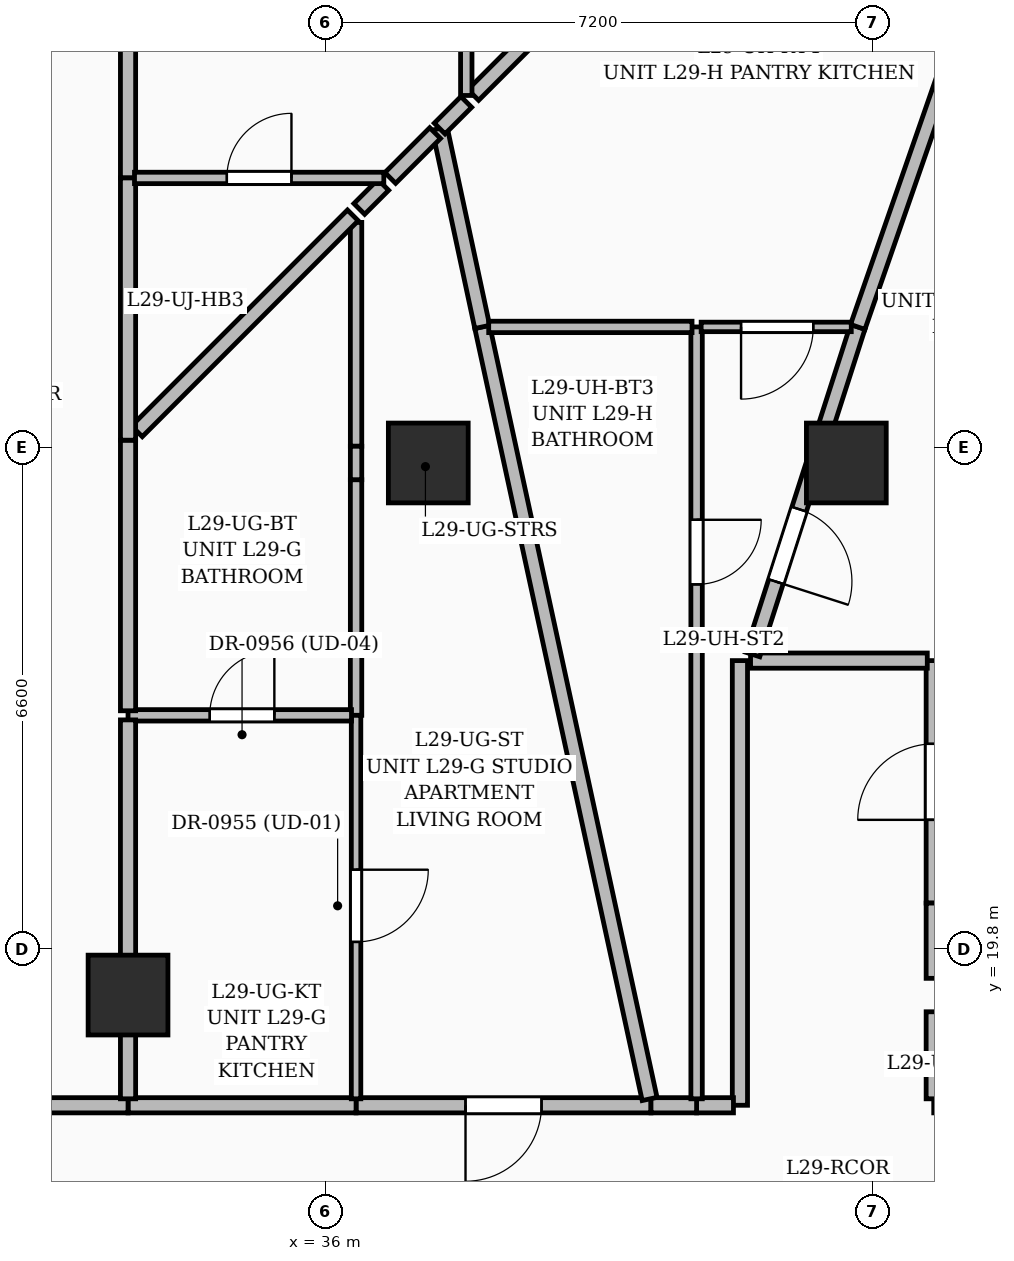
"""IFC4 building model, lengths in metres.
Left out: names, types, materials, properties, quantities, classifications, styles, units other than length and angle.
Written with IfcOpenShell. Run it as: python <this file> out.ifc"""

import sys

from ifc_helpers import new_model, si_unit, direction, frame, frame_2d, origin, origin_2d, place, context, subcontext, project, spatial, rectangle, extrude, element, fill, save


model = new_model("IFC4")
c1 = context("Model", 3, precision=1e-05, world=origin(), true_north=direction((0.0, 1.0)))
c2 = subcontext(c1, "Body", "Model", "MODEL_VIEW")
j1 = project(units=[si_unit("LENGTHUNIT", "METRE"), si_unit("PLANEANGLEUNIT", "RADIAN")], contexts=[c1])
p1 = place(None, origin())
s1 = spatial("IfcSite", under=j1, at=p1, CompositionType="ELEMENT")
p2 = place(p1, origin())
s2 = spatial("IfcBuilding", under=s1, at=p2, CompositionType="ELEMENT")
p3 = place(p2, frame((0.0, 0.0, 117.6)))
s3 = spatial("IfcBuildingStorey", under=s2, at=p3, CompositionType="ELEMENT", Elevation=117.6)
for number, where, z_axis, x_axis in (
    (1, (42.85, 26.2, 0.0), (0.0, 0.0, 1.0), (1.0, 0.0, 0.0)),
    (2, (37.35, 26.2, 0.0), (0.0, 0.0, 1.0), (1.0, 0.0, 0.0)),
    (3, (33.4, 19.2, 0.0), (0.0, 0.0, 1.0), (1.0, 0.0, 0.0)),
):
    element("IfcColumn", number, at=place(p3, frame(where, z_axis=z_axis, x_axis=x_axis)), inside=s3, PredefinedType="COLUMN", context=c2, shape_type="SweptSolid", body=[
        extrude(rectangle(XDim=1.05, YDim=1.05, at=origin_2d()), origin(), (0.0, 0.0, 1.0), 3.6),
    ])
p4 = place(p3, frame((42.472, 36.42, 0.0), z_axis=(0.0, 0.0, 1.0), x_axis=(0.506315009763, -0.86234860172, 0.0)))
e4 = element("IfcWall", 4, at=p4, inside=s3, PredefinedType="SOLIDWALL", context=c2, shape_type="SweptSolid", body=[
    extrude(rectangle(XDim=6.553, YDim=0.3, at=frame_2d((3.277, 0.0))), origin(), (0.0, 0.0, 1.0), 3.35),
])
p5 = place(p4, frame((1.975, 0.0, 0.55)))
e5 = element("IfcOpeningElement", 5, at=p5, cuts=e4, PredefinedType="OPENING", context=c2, shape_type="SweptSolid", body=[
    extrude(rectangle(XDim=1.6, YDim=2.2, at=frame_2d((0.8, 1.1))), frame((0.0, 0.16, 0.0), z_axis=(0.0, -1.0, 0.0), x_axis=(1.0, 0.0, 0.0)), (0.0, 0.0, 1.0), 0.32),
])
p6 = place(p3, frame((40.28, 17.75, 0.0), z_axis=(0.0, 0.0, 1.0), x_axis=(-1.0, 0.0, 0.0)))
e6 = element("IfcWall", 6, at=p6, inside=s3, PredefinedType="PARTITIONING", context=c2, shape_type="SweptSolid", body=[
    extrude(rectangle(XDim=3.88, YDim=0.2, at=frame_2d((1.94, 0.0))), origin(), (0.0, 0.0, 1.0), 3.35),
])
p7 = place(p6, frame((1.44, 0.0, 0.0)))
e7 = element("IfcOpeningElement", 7, at=p7, cuts=e6, PredefinedType="OPENING", context=c2, shape_type="SweptSolid", body=[
    extrude(rectangle(XDim=1.0, YDim=2.2, at=frame_2d((0.5, 1.1))), frame((0.0, 0.11, 0.0), z_axis=(0.0, -1.0, 0.0), x_axis=(1.0, 0.0, 0.0)), (0.0, 0.0, 1.0), 0.22),
])
p8 = place(p3, frame((36.4, 17.75, 0.0), z_axis=(0.0, 0.0, 1.0), x_axis=(-1.0, 0.0, 0.0)))
e8 = element("IfcWall", 8, at=p8, inside=s3, PredefinedType="PARTITIONING", context=c2, shape_type="SweptSolid", body=[
    extrude(rectangle(XDim=3.0, YDim=0.2, at=frame_2d((1.5, 0.0))), origin(), (0.0, 0.0, 1.0), 2.436),
])
p9 = place(p3, frame((44.0, 20.41, 0.0), z_axis=(0.0, 0.0, 1.0), x_axis=(0.0, 1.0, 0.0)))
e9 = element("IfcWall", 9, at=p9, inside=s3, PredefinedType="PARTITIONING", context=c2, shape_type="SweptSolid", body=[
    extrude(rectangle(XDim=3.19, YDim=0.2, at=frame_2d((1.595, 0.0))), origin(), (0.0, 0.0, 1.0), 2.436),
])
p10 = place(p9, frame((1.095, 0.0, 0.0)))
e10 = element("IfcOpeningElement", 10, at=p10, cuts=e9, PredefinedType="OPENING", context=c2, shape_type="SweptSolid", body=[
    extrude(rectangle(XDim=1.0, YDim=2.2, at=frame_2d((0.5, 1.1))), frame((0.0, 0.11, 0.0), z_axis=(0.0, -1.0, 0.0), x_axis=(1.0, 0.0, 0.0)), (0.0, 0.0, 1.0), 0.22),
])
p11 = place(p3, frame((43.915, 23.6, 0.0), z_axis=(0.0, 0.0, 1.0), x_axis=(-1.0, 0.0, 0.0)))
e11 = element("IfcWall", 11, at=p11, inside=s3, PredefinedType="PARTITIONING", context=c2, shape_type="SweptSolid", body=[
    extrude(rectangle(XDim=2.325, YDim=0.2, at=frame_2d((1.163, 0.0))), origin(), (0.0, 0.0, 1.0), 2.436),
])
p12 = place(p3, frame((44.0, 17.835, 0.0), z_axis=(0.0, 0.0, 1.0), x_axis=(0.0, 1.0, 0.0)))
e12 = element("IfcWall", 12, at=p12, inside=s3, PredefinedType="PARTITIONING", context=c2, shape_type="SweptSolid", body=[
    extrude(rectangle(XDim=1.145, YDim=0.2, at=frame_2d((0.573, 0.0))), origin(), (0.0, 0.0, 1.0), 3.35),
])
p13 = place(p3, frame((44.0, 19.42, 0.0), z_axis=(0.0, 0.0, 1.0), x_axis=(0.0, 1.0, 0.0)))
e13 = element("IfcWall", 13, at=p13, inside=s3, PredefinedType="PARTITIONING", context=c2, shape_type="SweptSolid", body=[
    extrude(rectangle(XDim=0.99, YDim=0.2, at=frame_2d((0.495, 0.0))), origin(), (0.0, 0.0, 1.0), 3.35),
])
p14 = place(p3, frame((33.4, 17.75, 0.0), z_axis=(0.0, 0.0, 1.0), x_axis=(-1.0, 0.0, 0.0)))
e14 = element("IfcWall", 14, at=p14, inside=s3, PredefinedType="PARTITIONING", context=c2, shape_type="SweptSolid", body=[
    extrude(rectangle(XDim=1.45, YDim=0.2, at=frame_2d((0.725, 0.0))), origin(), (0.0, 0.0, 1.0), 3.35),
])
p15 = place(p3, frame((41.45, 23.6, 0.0), z_axis=(0.0, 0.0, 1.0), x_axis=(0.0, -1.0, 0.0)))
e15 = element("IfcWall", 15, at=p15, inside=s3, PredefinedType="PARTITIONING", context=c2, shape_type="SweptSolid", body=[
    extrude(rectangle(XDim=5.85, YDim=0.2, at=frame_2d((2.925, 0.0))), origin(), (0.0, 0.0, 1.0), 2.853),
])
p16 = place(p3, frame((41.365, 17.75, 0.0), z_axis=(0.0, 0.0, 1.0), x_axis=(-1.0, 0.0, 0.0)))
e16 = element("IfcWall", 16, at=p16, inside=s3, PredefinedType="PARTITIONING", context=c2, shape_type="SweptSolid", body=[
    extrude(rectangle(XDim=0.485, YDim=0.2, at=frame_2d((0.243, 0.0))), origin(), (0.0, 0.0, 1.0), 3.35),
])
p17 = place(p3, frame((40.88, 17.75, 0.0), z_axis=(0.0, 0.0, 1.0), x_axis=(-1.0, 0.0, 0.0)))
e17 = element("IfcWall", 17, at=p17, inside=s3, PredefinedType="PARTITIONING", context=c2, shape_type="SweptSolid", body=[
    extrude(rectangle(XDim=0.6, YDim=0.2, at=frame_2d((0.3, 0.0))), origin(), (0.0, 0.0, 1.0), 3.35),
])
p18 = place(p3, frame((36.4, 25.98, 0.0), z_axis=(0.0, 0.0, 1.0), x_axis=(0.0, -1.0, 0.0)))
e18 = element("IfcWall", 18, at=p18, inside=s3, PredefinedType="PARTITIONING", context=c2, shape_type="SweptSolid", body=[
    extrude(rectangle(XDim=3.1, YDim=0.15, at=frame_2d((1.55, 0.0))), origin(), (0.0, 0.0, 1.0), 2.436),
])
p19 = place(p3, frame((36.4, 29.365, 0.0), z_axis=(0.0, 0.0, 1.0), x_axis=(0.0, -1.0, 0.0)))
e19 = element("IfcWall", 19, at=p19, inside=s3, PredefinedType="PARTITIONING", context=c2, shape_type="SweptSolid", body=[
    extrude(rectangle(XDim=2.945, YDim=0.15, at=frame_2d((1.473, 0.0))), origin(), (0.0, 0.0, 1.0), 2.372),
])
p20 = place(p3, frame((36.4, 22.88, 0.0), z_axis=(0.0, 0.0, 1.0), x_axis=(0.0, -1.0, 0.0)))
e20 = element("IfcWall", 20, at=p20, inside=s3, PredefinedType="PARTITIONING", context=c2, shape_type="SweptSolid", body=[
    extrude(rectangle(XDim=5.045, YDim=0.125, at=frame_2d((2.522, 0.0))), origin(), (0.0, 0.0, 1.0), 2.853),
])
p21 = place(p20, frame((2.031, 0.0, 0.0)))
e21 = element("IfcOpeningElement", 21, at=p21, cuts=e20, PredefinedType="OPENING", context=c2, shape_type="SweptSolid", body=[
    extrude(rectangle(XDim=0.95, YDim=2.2, at=frame_2d((0.475, 1.1))), frame((0.0, 0.072, 0.0), z_axis=(0.0, -1.0, 0.0), x_axis=(1.0, 0.0, 0.0)), (0.0, 0.0, 1.0), 0.145),
])
p22 = place(p3, frame((40.262, 17.833, 0.0), z_axis=(0.0, 0.0, 1.0), x_axis=(-0.211865908249, 0.977298744971, 0.0)))
e22 = element("IfcWall", 22, at=p22, inside=s3, PredefinedType="PARTITIONING", context=c2, shape_type="SweptSolid", body=[
    extrude(rectangle(XDim=10.393, YDim=0.2, at=frame_2d((5.196, 0.0))), origin(), (0.0, 0.0, 1.0), 2.436),
])
p23 = place(p3, frame((38.06, 27.99, 0.0), z_axis=(0.0, 0.0, 1.0), x_axis=(-0.209797646084, 0.977744827497, 0.0)))
e23 = element("IfcWall", 23, at=p23, inside=s3, PredefinedType="PARTITIONING", context=c2, shape_type="SweptSolid", body=[
    extrude(rectangle(XDim=2.669, YDim=0.2, at=frame_2d((1.335, 0.0))), origin(), (0.0, 0.0, 1.0), 2.771),
])
p24 = place(p3, frame((37.44, 30.54, 0.0), z_axis=(0.0, 0.0, 1.0), x_axis=(-0.707106781187, -0.707106781187, 0.0)))
e24 = element("IfcWall", 24, at=p24, inside=s3, PredefinedType="PARTITIONING", context=c2, shape_type="SweptSolid", body=[
    extrude(rectangle(XDim=0.834, YDim=0.2, at=frame_2d((0.417, 0.0))), origin(), (0.0, 0.0, 1.0), 2.771),
])
p25 = place(p3, frame((36.758, 29.858, 0.0), z_axis=(0.0, 0.0, 1.0), x_axis=(-0.707106781187, -0.707106781187, 0.0)))
e25 = element("IfcWall", 25, at=p25, inside=s3, PredefinedType="PARTITIONING", context=c2, shape_type="SweptSolid", body=[
    extrude(rectangle(XDim=0.447, YDim=0.2, at=frame_2d((0.223, 0.0))), origin(), (0.0, 0.0, 1.0), 3.35),
])
p26 = place(p3, frame((33.4, 22.88, 0.0), z_axis=(0.0, 0.0, 1.0), x_axis=(1.0, 0.0, 0.0)))
e26 = element("IfcWall", 26, at=p26, inside=s3, PredefinedType="PARTITIONING", context=c2, shape_type="SweptSolid", body=[
    extrude(rectangle(XDim=2.94, YDim=0.15, at=frame_2d((1.47, 0.0))), origin(), (0.0, 0.0, 1.0), 2.436),
])
p27 = place(p26, frame((1.075, 0.0, 0.0)))
e27 = element("IfcOpeningElement", 27, at=p27, cuts=e26, PredefinedType="OPENING", context=c2, shape_type="SweptSolid", body=[
    extrude(rectangle(XDim=0.85, YDim=2.1, at=frame_2d((0.425, 1.05))), frame((0.0, 0.085, 0.0), z_axis=(0.0, -1.0, 0.0), x_axis=(1.0, 0.0, 0.0)), (0.0, 0.0, 1.0), 0.17),
])
p28 = place(p3, frame((33.4, 26.5, 0.0), z_axis=(0.0, 0.0, 1.0), x_axis=(0.0, -1.0, 0.0)))
e28 = element("IfcWall", 28, at=p28, inside=s3, PredefinedType="PARTITIONING", context=c2, shape_type="SweptSolid", body=[
    extrude(rectangle(XDim=3.56, YDim=0.2, at=frame_2d((1.78, 0.0))), origin(), (0.0, 0.0, 1.0), 2.771),
])
p29 = place(p3, frame((36.358, 29.458, 0.0), z_axis=(0.0, 0.0, 1.0), x_axis=(-0.707137163672, -0.707076397395, 0.0)))
e29 = element("IfcWall", 29, at=p29, inside=s3, PredefinedType="PARTITIONING", context=c2, shape_type="SweptSolid", body=[
    extrude(rectangle(XDim=4.018, YDim=0.2, at=frame_2d((2.009, 0.0))), origin(), (0.0, 0.0, 1.0), 2.372),
])
p30 = place(p3, frame((33.4, 22.82, 0.0), z_axis=(0.0, 0.0, 1.0), x_axis=(0.0, -1.0, 0.0)))
e30 = element("IfcWall", 30, at=p30, inside=s3, PredefinedType="PARTITIONING", context=c2, shape_type="SweptSolid", body=[
    extrude(rectangle(XDim=4.985, YDim=0.2, at=frame_2d((2.493, 0.0))), origin(), (0.0, 0.0, 1.0), 2.436),
])
p31 = place(p3, frame((43.0, 27.99, 0.0), z_axis=(0.0, 0.0, 1.0), x_axis=(-0.305803129518, -0.95209476733, 0.0)))
e31 = element("IfcWall", 31, at=p31, inside=s3, PredefinedType="PARTITIONING", context=c2, shape_type="SweptSolid", body=[
    extrude(rectangle(XDim=4.526, YDim=0.2, at=frame_2d((2.263, 0.0))), origin(), (0.0, 0.0, 1.0), 2.372),
])
p32 = place(p31, frame((2.519, 0.0, 0.0)))
e32 = element("IfcOpeningElement", 32, at=p32, cuts=e31, PredefinedType="OPENING", context=c2, shape_type="SweptSolid", body=[
    extrude(rectangle(XDim=1.0, YDim=2.2, at=frame_2d((0.5, 1.1))), frame((0.0, 0.11, 0.0), z_axis=(0.0, -1.0, 0.0), x_axis=(1.0, 0.0, 0.0)), (0.0, 0.0, 1.0), 0.22),
])
p33 = place(p3, frame((44.581, 32.542, 0.0), z_axis=(0.0, 0.0, 1.0), x_axis=(-0.328103998337, -0.944641607318, 0.0)))
e33 = element("IfcWall", 33, at=p33, inside=s3, PredefinedType="PARTITIONING", context=c2, shape_type="SweptSolid", body=[
    extrude(rectangle(XDim=4.819, YDim=0.2, at=frame_2d((2.409, 0.0))), origin(), (0.0, 0.0, 1.0), 2.57),
])
p34 = place(p3, frame((33.4, 29.95, 0.0), z_axis=(0.0, 0.0, 1.0), x_axis=(0.0, 1.0, 0.0)))
e34 = element("IfcWall", 34, at=p34, inside=s3, PredefinedType="PARTITIONING", context=c2, shape_type="SweptSolid", body=[
    extrude(rectangle(XDim=5.11, YDim=0.2, at=frame_2d((2.555, 0.0))), origin(), (0.0, 0.0, 1.0), 2.372),
])
p35 = place(p34, frame((2.055, 0.0, 0.0)))
e35 = element("IfcOpeningElement", 35, at=p35, cuts=e34, PredefinedType="OPENING", context=c2, shape_type="SweptSolid", body=[
    extrude(rectangle(XDim=1.0, YDim=2.2, at=frame_2d((0.5, 1.1))), frame((0.0, 0.11, 0.0), z_axis=(0.0, -1.0, 0.0), x_axis=(1.0, 0.0, 0.0)), (0.0, 0.0, 1.0), 0.22),
])
p36 = place(p3, frame((33.4, 26.5, 0.0), z_axis=(0.0, 0.0, 1.0), x_axis=(0.0, 1.0, 0.0)))
e36 = element("IfcWall", 36, at=p36, inside=s3, PredefinedType="PARTITIONING", context=c2, shape_type="SweptSolid", body=[
    extrude(rectangle(XDim=3.45, YDim=0.2, at=frame_2d((1.725, 0.0))), origin(), (0.0, 0.0, 1.0), 2.771),
])
p37 = place(p3, frame((40.88, 27.99, 0.0), z_axis=(0.0, 0.0, 1.0), x_axis=(0.0, -1.0, 0.0)))
e37 = element("IfcWall", 37, at=p37, inside=s3, PredefinedType="PARTITIONING", context=c2, shape_type="SweptSolid", body=[
    extrude(rectangle(XDim=10.155, YDim=0.15, at=frame_2d((5.078, 0.0))), origin(), (0.0, 0.0, 1.0), 2.436),
])
p38 = place(p37, frame((2.537, 0.0, 0.0)))
e38 = element("IfcOpeningElement", 38, at=p38, cuts=e37, PredefinedType="OPENING", context=c2, shape_type="SweptSolid", body=[
    extrude(rectangle(XDim=0.85, YDim=2.1, at=frame_2d((0.425, 1.05))), frame((0.0, 0.085, 0.0), z_axis=(0.0, -1.0, 0.0), x_axis=(1.0, 0.0, 0.0)), (0.0, 0.0, 1.0), 0.17),
])
p39 = place(p3, frame((42.915, 27.99, 0.0), z_axis=(0.0, 0.0, 1.0), x_axis=(-1.0, 0.0, 0.0)))
e39 = element("IfcWall", 39, at=p39, inside=s3, PredefinedType="PARTITIONING", context=c2, shape_type="SweptSolid", body=[
    extrude(rectangle(XDim=1.975, YDim=0.125, at=frame_2d((0.988, 0.0))), origin(), (0.0, 0.0, 1.0), 2.372),
])
p40 = place(p39, frame((0.5, 0.0, 0.0)))
e40 = element("IfcOpeningElement", 40, at=p40, cuts=e39, PredefinedType="OPENING", context=c2, shape_type="SweptSolid", body=[
    extrude(rectangle(XDim=0.95, YDim=2.2, at=frame_2d((0.475, 1.1))), frame((0.0, 0.072, 0.0), z_axis=(0.0, -1.0, 0.0), x_axis=(1.0, 0.0, 0.0)), (0.0, 0.0, 1.0), 0.145),
])
p41 = place(p3, frame((40.82, 27.99, 0.0), z_axis=(0.0, 0.0, 1.0), x_axis=(-1.0, 0.0, 0.0)))
e41 = element("IfcWall", 41, at=p41, inside=s3, PredefinedType="PARTITIONING", context=c2, shape_type="SweptSolid", body=[
    extrude(rectangle(XDim=2.675, YDim=0.15, at=frame_2d((1.337, 0.0))), origin(), (0.0, 0.0, 1.0), 3.35),
])
p42 = place(p3, frame((37.85, 30.95, 0.0), z_axis=(0.0, 0.0, 1.0), x_axis=(-0.707353374636, -0.706860101711, 0.0)))
e42 = element("IfcWall", 42, at=p42, inside=s3, PredefinedType="PARTITIONING", context=c2, shape_type="SweptSolid", body=[
    extrude(rectangle(XDim=0.495, YDim=0.2, at=frame_2d((0.248, 0.0))), origin(), (0.0, 0.0, 1.0), 2.771),
])
p43 = place(p3, frame((41.684, 34.784, 0.0), z_axis=(0.0, 0.0, 1.0), x_axis=(-0.707106781187, -0.707106781187, 0.0)))
e43 = element("IfcWall", 43, at=p43, inside=s3, PredefinedType="PARTITIONING", context=c2, shape_type="SweptSolid", body=[
    extrude(rectangle(XDim=5.292, YDim=0.2, at=frame_2d((2.646, 0.0))), origin(), (0.0, 0.0, 1.0), 2.771),
])
p44 = place(p3, frame((33.485, 29.95, 0.0), z_axis=(0.0, 0.0, 1.0), x_axis=(1.0, 0.0, 0.0)))
e44 = element("IfcWall", 44, at=p44, inside=s3, PredefinedType="PARTITIONING", context=c2, shape_type="SweptSolid", body=[
    extrude(rectangle(XDim=3.28, YDim=0.15, at=frame_2d((1.64, 0.0))), origin(), (0.0, 0.0, 1.0), 2.372),
])
p45 = place(p44, frame((1.215, 0.0, 0.0)))
e45 = element("IfcOpeningElement", 45, at=p45, cuts=e44, PredefinedType="OPENING", context=c2, shape_type="SweptSolid", body=[
    extrude(rectangle(XDim=0.85, YDim=2.1, at=frame_2d((0.425, 1.05))), frame((0.0, 0.085, 0.0), z_axis=(0.0, -1.0, 0.0), x_axis=(1.0, 0.0, 0.0)), (0.0, 0.0, 1.0), 0.17),
])
p46 = place(p3, frame((37.85, 31.035, 0.0), z_axis=(0.0, 0.0, 1.0), x_axis=(0.0, 1.0, 0.0)))
e46 = element("IfcWall", 46, at=p46, inside=s3, PredefinedType="PARTITIONING", context=c2, shape_type="SweptSolid", body=[
    extrude(rectangle(XDim=3.855, YDim=0.15, at=frame_2d((1.927, 0.0))), origin(), (0.0, 0.0, 1.0), 2.771),
])
p47 = place(p46, frame((1.351, 0.0, 0.0)))
e47 = element("IfcOpeningElement", 47, at=p47, cuts=e46, PredefinedType="OPENING", context=c2, shape_type="SweptSolid", body=[
    extrude(rectangle(XDim=0.95, YDim=2.2, at=frame_2d((0.475, 1.1))), frame((0.0, 0.085, 0.0), z_axis=(0.0, -1.0, 0.0), x_axis=(1.0, 0.0, 0.0)), (0.0, 0.0, 1.0), 0.17),
])
p48 = place(p3, frame((36.4, 25.98, 0.0), z_axis=(0.0, 0.0, 1.0), x_axis=(0.0, 1.0, 0.0)))
e48 = element("IfcWall", 48, at=p48, inside=s3, PredefinedType="PARTITIONING", context=c2, shape_type="SweptSolid", body=[
    extrude(rectangle(XDim=0.44, YDim=0.15, at=frame_2d((0.22, 0.0))), origin(), (0.0, 0.0, 1.0), 3.35),
])
p49 = place(p7, origin())
e49 = element("IfcDoor", 49, at=p49, inside=s3, OperationType="SINGLE_SWING_RIGHT", PredefinedType="DOOR", context=c2, shape_type="SweptSolid", body=[
    extrude(rectangle(XDim=1.0, YDim=2.2, at=frame_2d((0.5, 1.1))), frame((0.0, 0.025, 0.0), z_axis=(0.0, -1.0, 0.0), x_axis=(1.0, 0.0, 0.0)), (0.0, 0.0, 1.0), 0.05),
])
fill(e7, e49)
p50 = place(p21, origin())
e50 = element("IfcDoor", 50, at=p50, inside=s3, OperationType="SINGLE_SWING_LEFT", PredefinedType="DOOR", context=c2, shape_type="SweptSolid", body=[
    extrude(rectangle(XDim=0.95, YDim=2.2, at=frame_2d((0.475, 1.1))), frame((0.0, 0.025, 0.0), z_axis=(0.0, -1.0, 0.0), x_axis=(1.0, 0.0, 0.0)), (0.0, 0.0, 1.0), 0.05),
])
fill(e21, e50)
p51 = place(p27, origin())
e51 = element("IfcDoor", 51, at=p51, inside=s3, OperationType="SINGLE_SWING_RIGHT", PredefinedType="DOOR", context=c2, shape_type="SweptSolid", body=[
    extrude(rectangle(XDim=0.85, YDim=2.1, at=frame_2d((0.425, 1.05))), frame((0.0, 0.025, 0.0), z_axis=(0.0, -1.0, 0.0), x_axis=(1.0, 0.0, 0.0)), (0.0, 0.0, 1.0), 0.05),
])
fill(e27, e51)
p52 = place(p10, origin())
e52 = element("IfcDoor", 52, at=p52, inside=s3, OperationType="SINGLE_SWING_LEFT", PredefinedType="DOOR", context=c2, shape_type="SweptSolid", body=[
    extrude(rectangle(XDim=1.0, YDim=2.2, at=frame_2d((0.5, 1.1))), frame((0.0, 0.025, 0.0), z_axis=(0.0, -1.0, 0.0), x_axis=(1.0, 0.0, 0.0)), (0.0, 0.0, 1.0), 0.05),
])
fill(e10, e52)
p53 = place(p40, origin())
e53 = element("IfcDoor", 53, at=p53, inside=s3, OperationType="SINGLE_SWING_RIGHT", PredefinedType="DOOR", context=c2, shape_type="SweptSolid", body=[
    extrude(rectangle(XDim=0.95, YDim=2.2, at=frame_2d((0.475, 1.1))), frame((0.0, 0.025, 0.0), z_axis=(0.0, -1.0, 0.0), x_axis=(1.0, 0.0, 0.0)), (0.0, 0.0, 1.0), 0.05),
])
fill(e40, e53)
p54 = place(p38, origin())
e54 = element("IfcDoor", 54, at=p54, inside=s3, OperationType="SINGLE_SWING_LEFT", PredefinedType="DOOR", context=c2, shape_type="SweptSolid", body=[
    extrude(rectangle(XDim=0.85, YDim=2.1, at=frame_2d((0.425, 1.05))), frame((0.0, 0.025, 0.0), z_axis=(0.0, -1.0, 0.0), x_axis=(1.0, 0.0, 0.0)), (0.0, 0.0, 1.0), 0.05),
])
fill(e38, e54)
p55 = place(p45, origin())
e55 = element("IfcDoor", 55, at=p55, inside=s3, OperationType="SINGLE_SWING_RIGHT", PredefinedType="DOOR", context=c2, shape_type="SweptSolid", body=[
    extrude(rectangle(XDim=0.85, YDim=2.1, at=frame_2d((0.425, 1.05))), frame((0.0, 0.025, 0.0), z_axis=(0.0, -1.0, 0.0), x_axis=(1.0, 0.0, 0.0)), (0.0, 0.0, 1.0), 0.05),
])
fill(e45, e55)
p56 = place(p32, origin())
e56 = element("IfcDoor", 56, at=p56, inside=s3, OperationType="SINGLE_SWING_RIGHT", PredefinedType="DOOR", context=c2, shape_type="SweptSolid", body=[
    extrude(rectangle(XDim=1.0, YDim=2.2, at=frame_2d((0.5, 1.1))), frame((0.0, 0.025, 0.0), z_axis=(0.0, -1.0, 0.0), x_axis=(1.0, 0.0, 0.0)), (0.0, 0.0, 1.0), 0.05),
])
fill(e32, e56)
save(model, sys.argv[1])
